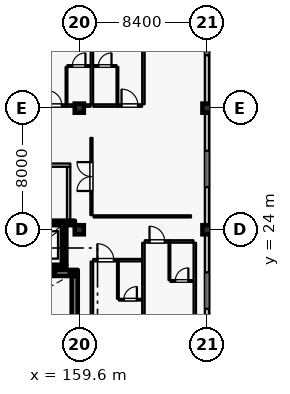
"""IFC4 building model, lengths in metres.
Left out: names, types, materials, properties, quantities, classifications, styles, units other than length and angle.
Written with IfcOpenShell. Run it as: python <this file> out.ifc"""

import sys

from ifc_helpers import new_model, si_unit, direction, frame, frame_2d, origin, origin_2d, place, context, subcontext, project, spatial, rectangle, hollow_rectangle, extrude, element, fill, save


model = new_model("IFC4")
c1 = context("Model", 3, precision=1e-05, world=origin(), true_north=direction((0.0, 1.0)))
c2 = subcontext(c1, "Body", "Model", "MODEL_VIEW")
j1 = project(units=[si_unit("LENGTHUNIT", "METRE"), si_unit("PLANEANGLEUNIT", "RADIAN")], contexts=[c1])
p1 = place(None, origin())
s1 = spatial("IfcSite", under=j1, at=p1, CompositionType="ELEMENT")
p2 = place(p1, origin())
s2 = spatial("IfcBuilding", under=s1, at=p2, CompositionType="ELEMENT")
p3 = place(p2, frame((0.0, 0.0, 43.2)))
s3 = spatial("IfcBuildingStorey", under=s2, at=p3, CompositionType="ELEMENT", Elevation=43.2)
for number, where, z_axis, x_axis in (
    (1, (159.6, 24.0, 0.0), (0.0, 0.0, 1.0), (1.0, 0.0, 0.0)),
    (2, (168.0, 32.0, 0.0), (0.0, 0.0, 1.0), (1.0, 0.0, 0.0)),
    (3, (159.6, 32.0, 0.0), (0.0, 0.0, 1.0), (1.0, 0.0, 0.0)),
    (4, (168.0, 24.0, 0.0), (0.0, 0.0, 1.0), (1.0, 0.0, 0.0)),
):
    element("IfcColumn", number, at=place(p3, frame(where, z_axis=z_axis, x_axis=x_axis)), inside=s3, PredefinedType="COLUMN", context=c2, shape_type="SweptSolid", body=[
        extrude(rectangle(XDim=0.6, YDim=0.6, at=origin_2d()), origin(), (0.0, 0.0, 1.0), 4.2),
    ])
p4 = place(p3, frame((168.0, 39.7, 0.0), z_axis=(0.0, 0.0, 1.0), x_axis=(0.0, -1.0, 0.0)))
e5 = element("IfcWall", 5, at=p4, inside=s3, PredefinedType="SOLIDWALL", context=c2, shape_type="SweptSolid", body=[
    extrude(rectangle(XDim=7.4, YDim=0.28, at=frame_2d((3.7, 0.0))), origin(), (0.0, 0.0, 1.0), 3.3),
])
p5 = place(p4, frame((3.175, 0.0, 0.75)))
e6 = element("IfcOpeningElement", 6, at=p5, cuts=e5, PredefinedType="OPENING", context=c2, shape_type="SweptSolid", body=[
    extrude(rectangle(XDim=1.05, YDim=1.65, at=frame_2d((0.525, 0.825))), frame((0.0, 0.15, 0.0), z_axis=(0.0, -1.0, 0.0), x_axis=(1.0, 0.0, 0.0)), (0.0, 0.0, 1.0), 0.3),
])
p6 = place(p3, frame((168.0, 31.7, 0.0), z_axis=(0.0, 0.0, 1.0), x_axis=(0.0, -1.0, 0.0)))
e7 = element("IfcWall", 7, at=p6, inside=s3, PredefinedType="SOLIDWALL", context=c2, shape_type="SweptSolid", body=[
    extrude(rectangle(XDim=7.4, YDim=0.28, at=frame_2d((3.7, 0.0))), origin(), (0.0, 0.0, 1.0), 3.3),
])
p7 = place(p6, frame((2.5, 0.0, 0.75)))
e8 = element("IfcOpeningElement", 8, at=p7, cuts=e7, PredefinedType="OPENING", context=c2, shape_type="SweptSolid", body=[
    extrude(rectangle(XDim=2.4, YDim=1.65, at=frame_2d((1.2, 0.825))), frame((0.0, 0.15, 0.0), z_axis=(0.0, -1.0, 0.0), x_axis=(1.0, 0.0, 0.0)), (0.0, 0.0, 1.0), 0.3),
])
p8 = place(p3, frame((168.0, 23.7, 0.0), z_axis=(0.0, 0.0, 1.0), x_axis=(0.0, -1.0, 0.0)))
e9 = element("IfcWall", 9, at=p8, inside=s3, PredefinedType="SOLIDWALL", context=c2, shape_type="SweptSolid", body=[
    extrude(rectangle(XDim=7.4, YDim=0.28, at=frame_2d((3.7, 0.0))), origin(), (0.0, 0.0, 1.0), 3.3),
])
p9 = place(p8, frame((2.5, 0.0, 0.75)))
e10 = element("IfcOpeningElement", 10, at=p9, cuts=e9, PredefinedType="OPENING", context=c2, shape_type="SweptSolid", body=[
    extrude(rectangle(XDim=2.4, YDim=1.65, at=frame_2d((1.2, 0.825))), frame((0.0, 0.15, 0.0), z_axis=(0.0, -1.0, 0.0), x_axis=(1.0, 0.0, 0.0)), (0.0, 0.0, 1.0), 0.3),
])
p10 = place(p3, frame((155.25, 21.55, 0.0), z_axis=(0.0, 0.0, 1.0), x_axis=(1.0, 0.0, 0.0)))
e11 = element("IfcWall", 11, at=p10, inside=s3, PredefinedType="SHEAR", context=c2, shape_type="SweptSolid", body=[
    extrude(rectangle(XDim=3.5, YDim=0.3, at=frame_2d((1.75, 0.0))), origin(), (0.0, 0.0, 1.0), 3.935),
])
p11 = place(p3, frame((158.6, 21.705, 0.0), z_axis=(0.0, 0.0, 1.0), x_axis=(0.0, 1.0, 0.0)))
e12 = element("IfcWall", 12, at=p11, inside=s3, PredefinedType="SHEAR", context=c2, shape_type="SweptSolid", body=[
    extrude(rectangle(XDim=2.59, YDim=0.3, at=frame_2d((1.295, 0.0))), origin(), (0.0, 0.0, 1.0), 3.935),
])
p12 = place(p3, frame((159.31, 24.45, 0.0), z_axis=(0.0, 0.0, 1.0), x_axis=(-1.0, 0.0, 0.0)))
e13 = element("IfcWall", 13, at=p12, inside=s3, PredefinedType="SHEAR", context=c2, shape_type="SweptSolid", body=[
    extrude(rectangle(XDim=4.06, YDim=0.3, at=frame_2d((2.03, 0.0))), origin(), (0.0, 0.0, 1.0), 3.935),
])
p13 = place(p12, frame((1.685, 0.0, 0.0)))
e14 = element("IfcOpeningElement", 14, at=p13, cuts=e13, PredefinedType="OPENING", context=c2, shape_type="SweptSolid", body=[
    extrude(rectangle(XDim=1.25, YDim=2.25, at=frame_2d((0.625, 1.125))), frame((0.0, 0.16, 0.0), z_axis=(0.0, -1.0, 0.0), x_axis=(1.0, 0.0, 0.0)), (0.0, 0.0, 1.0), 0.32),
])
p14 = place(p3, frame((159.3, 17.005, 0.0), z_axis=(0.0, 0.0, 1.0), x_axis=(0.0, 1.0, 0.0)))
e15 = element("IfcWall", 15, at=p14, inside=s3, PredefinedType="SHEAR", context=c2, shape_type="SweptSolid", body=[
    extrude(rectangle(XDim=3.95, YDim=0.4, at=frame_2d((1.975, 0.0))), origin(), (0.0, 0.0, 1.0), 3.935),
])
p15 = place(p3, frame((151.3, 21.16, 0.0), z_axis=(0.0, 0.0, 1.0), x_axis=(1.0, 0.0, 0.0)))
e16 = element("IfcWall", 16, at=p15, inside=s3, PredefinedType="SHEAR", context=c2, shape_type="SweptSolid", body=[
    extrude(rectangle(XDim=8.2, YDim=0.4, at=frame_2d((4.1, 0.0))), origin(), (0.0, 0.0, 1.0), 3.935),
])
p16 = place(p15, frame((0.43, 0.0, 0.0)))
e17 = element("IfcOpeningElement", 17, at=p16, cuts=e16, PredefinedType="OPENING", context=c2, shape_type="SweptSolid", body=[
    extrude(rectangle(XDim=1.16, YDim=2.2, at=frame_2d((0.58, 1.1))), frame((0.0, 0.21, 0.0), z_axis=(0.0, -1.0, 0.0), x_axis=(1.0, 0.0, 0.0)), (0.0, 0.0, 1.0), 0.42),
])
p17 = place(p3, frame((158.9, 24.605, 0.0), z_axis=(0.0, 0.0, 1.0), x_axis=(0.0, 1.0, 0.0)))
e18 = element("IfcWall", 18, at=p17, inside=s3, PredefinedType="PARTITIONING", context=c2, shape_type="SweptSolid", body=[
    extrude(rectangle(XDim=3.53, YDim=0.22, at=frame_2d((1.765, 0.0))), origin(), (0.0, 0.0, 1.0), 3.935),
])
p18 = place(p3, frame((154.99, 28.25, 0.0), z_axis=(0.0, 0.0, 1.0), x_axis=(1.0, 0.0, 0.0)))
e19 = element("IfcWall", 19, at=p18, inside=s3, PredefinedType="PARTITIONING", context=c2, shape_type="SweptSolid", body=[
    extrude(rectangle(XDim=4.02, YDim=0.22, at=frame_2d((2.01, 0.0))), origin(), (0.0, 0.0, 1.0), 3.935),
])
p19 = place(p18, frame((1.39, 0.0, 0.0)))
e20 = element("IfcOpeningElement", 20, at=p19, cuts=e19, PredefinedType="OPENING", context=c2, shape_type="SweptSolid", body=[
    extrude(rectangle(XDim=1.24, YDim=2.2, at=frame_2d((0.62, 1.1))), frame((0.0, 0.12, 0.0), z_axis=(0.0, -1.0, 0.0), x_axis=(1.0, 0.0, 0.0)), (0.0, 0.0, 1.0), 0.24),
])
for number, where, z_axis, x_axis in (
    (21, (157.86, 21.16, -1.8), (0.0, 0.0, 1.0), (1.0, 0.0, 0.0)),
    (22, (159.12, 21.16, -1.8), (0.0, 0.0, 1.0), (1.0, 0.0, 0.0)),
):
    element("IfcColumn", number, at=place(p3, frame(where, z_axis=z_axis, x_axis=x_axis)), inside=s3, PredefinedType="COLUMN", context=c2, shape_type="SweptSolid", body=[
        extrude(hollow_rectangle(XDim=0.3, YDim=0.3, WallThickness=0.012, at=origin_2d()), origin(), (0.0, 0.0, 1.0), 3.72),
    ])
p20 = place(p3, frame((157.14, 32.17, 0.0), z_axis=(0.0, 0.0, 1.0), x_axis=(1.0, 0.0, 0.0)))
e23 = element("IfcWall", 23, at=p20, inside=s3, PredefinedType="PARTITIONING", context=c2, shape_type="SweptSolid", body=[
    extrude(rectangle(XDim=1.62, YDim=0.16, at=frame_2d((0.81, 0.0))), origin(), (0.0, 0.0, 1.0), 3.39),
])
p21 = place(p20, frame((0.31, 0.0, 0.0)))
e24 = element("IfcOpeningElement", 24, at=p21, cuts=e23, PredefinedType="OPENING", context=c2, shape_type="SweptSolid", body=[
    extrude(rectangle(XDim=1.0, YDim=2.25, at=frame_2d((0.5, 1.125))), frame((0.0, 0.09, 0.0), z_axis=(0.0, -1.0, 0.0), x_axis=(1.0, 0.0, 0.0)), (0.0, 0.0, 1.0), 0.18),
])
p22 = place(p3, frame((158.77, 32.17, 0.0), z_axis=(0.0, 0.0, 1.0), x_axis=(1.0, 0.0, 0.0)))
e25 = element("IfcWall", 25, at=p22, inside=s3, PredefinedType="PARTITIONING", context=c2, shape_type="SweptSolid", body=[
    extrude(rectangle(XDim=0.534, YDim=0.16, at=frame_2d((0.267, 0.0))), origin(), (0.0, 0.0, 1.0), 3.39),
])
p23 = place(p3, frame((158.76, 32.26, 0.0), z_axis=(0.0, 0.0, 1.0), x_axis=(0.0, 1.0, 0.0)))
e26 = element("IfcWall", 26, at=p23, inside=s3, PredefinedType="PARTITIONING", context=c2, shape_type="SweptSolid", body=[
    extrude(rectangle(XDim=2.45, YDim=0.115, at=frame_2d((1.225, 0.0))), origin(), (0.0, 0.0, 1.0), 3.935),
])
p24 = place(p3, frame((158.82, 34.77, 0.0), z_axis=(0.0, 0.0, 1.0), x_axis=(1.0, 0.0, 0.0)))
e27 = element("IfcWall", 27, at=p24, inside=s3, PredefinedType="PARTITIONING", context=c2, shape_type="SweptSolid", body=[
    extrude(rectangle(XDim=1.51, YDim=0.115, at=frame_2d((0.755, 0.0))), origin(), (0.0, 0.0, 1.0), 3.935),
])
p25 = place(p24, frame((0.325, 0.0, 0.0)))
e28 = element("IfcOpeningElement", 28, at=p25, cuts=e27, PredefinedType="OPENING", context=c2, shape_type="SweptSolid", body=[
    extrude(rectangle(XDim=0.86, YDim=2.12, at=frame_2d((0.43, 1.06))), frame((0.0, 0.067, 0.0), z_axis=(0.0, -1.0, 0.0), x_axis=(1.0, 0.0, 0.0)), (0.0, 0.0, 1.0), 0.135),
])
p26 = place(p3, frame((160.52, 32.17, 0.0), z_axis=(0.0, 0.0, 1.0), x_axis=(1.0, 0.0, 0.0)))
e29 = element("IfcWall", 29, at=p26, inside=s3, PredefinedType="PARTITIONING", context=c2, shape_type="SweptSolid", body=[
    extrude(rectangle(XDim=1.58, YDim=0.16, at=frame_2d((0.79, 0.0))), origin(), (0.0, 0.0, 1.0), 3.935),
])
p27 = place(p3, frame((162.11, 32.17, 0.0), z_axis=(0.0, 0.0, 1.0), x_axis=(1.0, 0.0, 0.0)))
e30 = element("IfcWall", 30, at=p27, inside=s3, PredefinedType="PARTITIONING", context=c2, shape_type="SweptSolid", body=[
    extrude(rectangle(XDim=1.62, YDim=0.16, at=frame_2d((0.81, 0.0))), origin(), (0.0, 0.0, 1.0), 3.935),
])
p28 = place(p27, frame((0.27, 0.0, 0.0)))
e31 = element("IfcOpeningElement", 31, at=p28, cuts=e30, PredefinedType="OPENING", context=c2, shape_type="SweptSolid", body=[
    extrude(rectangle(XDim=1.08, YDim=2.3, at=frame_2d((0.54, 1.15))), frame((0.0, 0.09, 0.0), z_axis=(0.0, -1.0, 0.0), x_axis=(1.0, 0.0, 0.0)), (0.0, 0.0, 1.0), 0.18),
])
p29 = place(p3, frame((162.11, 32.26, 0.0), z_axis=(0.0, 0.0, 1.0), x_axis=(0.0, 1.0, 0.0)))
e32 = element("IfcWall", 32, at=p29, inside=s3, PredefinedType="PARTITIONING", context=c2, shape_type="SweptSolid", body=[
    extrude(rectangle(XDim=2.45, YDim=0.115, at=frame_2d((1.225, 0.0))), origin(), (0.0, 0.0, 1.0), 3.935),
])
p30 = place(p3, frame((160.53, 34.77, 0.0), z_axis=(0.0, 0.0, 1.0), x_axis=(1.0, 0.0, 0.0)))
e33 = element("IfcWall", 33, at=p30, inside=s3, PredefinedType="PARTITIONING", context=c2, shape_type="SweptSolid", body=[
    extrude(rectangle(XDim=1.52, YDim=0.115, at=frame_2d((0.76, 0.0))), origin(), (0.0, 0.0, 1.0), 3.935),
])
p31 = place(p30, frame((0.33, 0.0, 0.0)))
e34 = element("IfcOpeningElement", 34, at=p31, cuts=e33, PredefinedType="OPENING", context=c2, shape_type="SweptSolid", body=[
    extrude(rectangle(XDim=0.86, YDim=2.12, at=frame_2d((0.43, 1.06))), frame((0.0, 0.067, 0.0), z_axis=(0.0, -1.0, 0.0), x_axis=(1.0, 0.0, 0.0)), (0.0, 0.0, 1.0), 0.135),
])
for number, where, z_axis, x_axis in (
    (35, (160.43, 32.26, 0.0), (0.0, 0.0, 1.0), (0.0, 1.0, 0.0)),
    (36, (163.82, 32.26, 0.0), (0.0, 0.0, 1.0), (0.0, 1.0, 0.0)),
):
    element("IfcWall", number, at=place(p3, frame(where, z_axis=z_axis, x_axis=x_axis)), inside=s3, PredefinedType="PARTITIONING", context=c2, shape_type="SweptSolid", body=[
        extrude(rectangle(XDim=8.19, YDim=0.16, at=frame_2d((4.095, 0.0))), origin(), (0.0, 0.0, 1.0), 3.935),
    ])
p32 = place(p3, frame((160.52, 22.0, 0.0), z_axis=(0.0, 0.0, 1.0), x_axis=(1.0, 0.0, 0.0)))
e37 = element("IfcWall", 37, at=p32, inside=s3, PredefinedType="PARTITIONING", context=c2, shape_type="SweptSolid", body=[
    extrude(rectangle(XDim=1.62, YDim=0.16, at=frame_2d((0.81, 0.0))), origin(), (0.0, 0.0, 1.0), 3.935),
])
p33 = place(p32, frame((0.27, 0.0, 0.0)))
e38 = element("IfcOpeningElement", 38, at=p33, cuts=e37, PredefinedType="OPENING", context=c2, shape_type="SweptSolid", body=[
    extrude(rectangle(XDim=1.08, YDim=2.3, at=frame_2d((0.54, 1.15))), frame((0.0, 0.09, 0.0), z_axis=(0.0, -1.0, 0.0), x_axis=(1.0, 0.0, 0.0)), (0.0, 0.0, 1.0), 0.18),
])
p34 = place(p3, frame((162.15, 22.0, 0.0), z_axis=(0.0, 0.0, 1.0), x_axis=(1.0, 0.0, 0.0)))
e39 = element("IfcWall", 39, at=p34, inside=s3, PredefinedType="PARTITIONING", context=c2, shape_type="SweptSolid", body=[
    extrude(rectangle(XDim=1.58, YDim=0.16, at=frame_2d((0.79, 0.0))), origin(), (0.0, 0.0, 1.0), 3.935),
])
p35 = place(p3, frame((162.14, 19.46, 0.0), z_axis=(0.0, 0.0, 1.0), x_axis=(0.0, 1.0, 0.0)))
e40 = element("IfcWall", 40, at=p35, inside=s3, PredefinedType="PARTITIONING", context=c2, shape_type="SweptSolid", body=[
    extrude(rectangle(XDim=2.45, YDim=0.115, at=frame_2d((1.225, 0.0))), origin(), (0.0, 0.0, 1.0), 3.935),
])
p36 = place(p3, frame((162.2, 19.4, 0.0), z_axis=(0.0, 0.0, 1.0), x_axis=(1.0, 0.0, 0.0)))
e41 = element("IfcWall", 41, at=p36, inside=s3, PredefinedType="PARTITIONING", context=c2, shape_type="SweptSolid", body=[
    extrude(rectangle(XDim=1.52, YDim=0.115, at=frame_2d((0.76, 0.0))), origin(), (0.0, 0.0, 1.0), 3.935),
])
p37 = place(p36, frame((0.33, 0.0, 0.0)))
e42 = element("IfcOpeningElement", 42, at=p37, cuts=e41, PredefinedType="OPENING", context=c2, shape_type="SweptSolid", body=[
    extrude(rectangle(XDim=0.86, YDim=2.12, at=frame_2d((0.43, 1.06))), frame((0.0, 0.067, 0.0), z_axis=(0.0, -1.0, 0.0), x_axis=(1.0, 0.0, 0.0)), (0.0, 0.0, 1.0), 0.135),
])
p38 = place(p3, frame((160.43, 12.36, 0.0), z_axis=(0.0, 0.0, 1.0), x_axis=(0.0, 1.0, 0.0)))
e43 = element("IfcWall", 43, at=p38, inside=s3, PredefinedType="PARTITIONING", context=c2, shape_type="SweptSolid", body=[
    extrude(rectangle(XDim=9.55, YDim=0.16, at=frame_2d((4.775, 0.0))), origin(), (0.0, 0.0, 1.0), 3.935),
])
p39 = place(p3, frame((163.91, 23.23, 0.0), z_axis=(0.0, 0.0, 1.0), x_axis=(1.0, 0.0, 0.0)))
e44 = element("IfcWall", 44, at=p39, inside=s3, PredefinedType="PARTITIONING", context=c2, shape_type="SweptSolid", body=[
    extrude(rectangle(XDim=1.62, YDim=0.16, at=frame_2d((0.81, 0.0))), origin(), (0.0, 0.0, 1.0), 3.935),
])
p40 = place(p39, frame((0.31, 0.0, 0.0)))
e45 = element("IfcOpeningElement", 45, at=p40, cuts=e44, PredefinedType="OPENING", context=c2, shape_type="SweptSolid", body=[
    extrude(rectangle(XDim=1.0, YDim=2.25, at=frame_2d((0.5, 1.125))), frame((0.0, 0.09, 0.0), z_axis=(0.0, -1.0, 0.0), x_axis=(1.0, 0.0, 0.0)), (0.0, 0.0, 1.0), 0.18),
])
p41 = place(p3, frame((165.54, 23.23, 0.0), z_axis=(0.0, 0.0, 1.0), x_axis=(1.0, 0.0, 0.0)))
e46 = element("IfcWall", 46, at=p41, inside=s3, PredefinedType="PARTITIONING", context=c2, shape_type="SweptSolid", body=[
    extrude(rectangle(XDim=1.57, YDim=0.16, at=frame_2d((0.785, 0.0))), origin(), (0.0, 0.0, 1.0), 3.935),
])
p42 = place(p3, frame((165.53, 20.69, 0.0), z_axis=(0.0, 0.0, 1.0), x_axis=(0.0, 1.0, 0.0)))
e47 = element("IfcWall", 47, at=p42, inside=s3, PredefinedType="PARTITIONING", context=c2, shape_type="SweptSolid", body=[
    extrude(rectangle(XDim=2.45, YDim=0.115, at=frame_2d((1.225, 0.0))), origin(), (0.0, 0.0, 1.0), 3.935),
])
p43 = place(p3, frame((165.59, 20.63, 0.0), z_axis=(0.0, 0.0, 1.0), x_axis=(1.0, 0.0, 0.0)))
e48 = element("IfcWall", 48, at=p43, inside=s3, PredefinedType="PARTITIONING", context=c2, shape_type="SweptSolid", body=[
    extrude(rectangle(XDim=1.51, YDim=0.115, at=frame_2d((0.755, 0.0))), origin(), (0.0, 0.0, 1.0), 3.935),
])
p44 = place(p43, frame((0.325, 0.0, 0.0)))
e49 = element("IfcOpeningElement", 49, at=p44, cuts=e48, PredefinedType="OPENING", context=c2, shape_type="SweptSolid", body=[
    extrude(rectangle(XDim=0.86, YDim=2.12, at=frame_2d((0.43, 1.06))), frame((0.0, 0.067, 0.0), z_axis=(0.0, -1.0, 0.0), x_axis=(1.0, 0.0, 0.0)), (0.0, 0.0, 1.0), 0.135),
])
for number, where, z_axis, x_axis in (
    (50, (163.82, 15.58, 0.0), (0.0, 0.0, 1.0), (0.0, 1.0, 0.0)),
    (51, (167.2, 15.58, 0.0), (0.0, 0.0, 1.0), (0.0, 1.0, 0.0)),
):
    element("IfcWall", number, at=place(p3, frame(where, z_axis=z_axis, x_axis=x_axis)), inside=s3, PredefinedType="PARTITIONING", context=c2, shape_type="SweptSolid", body=[
        extrude(rectangle(XDim=7.56, YDim=0.16, at=frame_2d((3.78, 0.0))), origin(), (0.0, 0.0, 1.0), 3.935),
    ])
p45 = place(p3, frame((160.4, 24.96, 0.0), z_axis=(0.0, 0.0, 1.0), x_axis=(0.0, 1.0, 0.0)))
e52 = element("IfcWall", 52, at=p45, inside=s3, PredefinedType="PARTITIONING", context=c2, shape_type="SweptSolid", body=[
    extrude(rectangle(XDim=5.08, YDim=0.14, at=frame_2d((2.54, 0.0))), origin(), (0.0, 0.0, 1.0), 3.935),
])
p46 = place(p45, frame((1.59, 0.0, 0.0)))
e53 = element("IfcOpeningElement", 53, at=p46, cuts=e52, PredefinedType="OPENING", context=c2, shape_type="SweptSolid", body=[
    extrude(rectangle(XDim=1.9, YDim=2.4, at=frame_2d((0.95, 1.2))), frame((0.0, 0.08, 0.0), z_axis=(0.0, -1.0, 0.0), x_axis=(1.0, 0.0, 0.0)), (0.0, 0.0, 1.0), 0.16),
])
p47 = place(p3, frame((160.54, 24.88, 0.0), z_axis=(0.0, 0.0, 1.0), x_axis=(1.0, 0.0, 0.0)))
e54 = element("IfcWall", 54, at=p47, inside=s3, PredefinedType="PARTITIONING", context=c2, shape_type="SweptSolid", body=[
    extrude(rectangle(XDim=6.41, YDim=0.14, at=frame_2d((3.205, 0.0))), origin(), (0.0, 0.0, 1.0), 3.935),
])
p48 = place(p3, frame((159.304, 32.17, 0.0), z_axis=(0.0, 0.0, 1.0), x_axis=(1.0, 0.0, 0.0)))
e55 = element("IfcWall", 55, at=p48, inside=s3, PredefinedType="PARTITIONING", context=c2, shape_type="SweptSolid", body=[
    extrude(rectangle(XDim=1.036, YDim=0.16, at=frame_2d((0.518, 0.0))), origin(), (0.0, 0.0, 1.0), 3.935),
])
p49 = place(p5, origin())
e56 = element("IfcWindow", 56, at=p49, inside=s3, PartitioningType="SINGLE_PANEL", PredefinedType="WINDOW", context=c2, shape_type="SweptSolid", body=[
    extrude(rectangle(XDim=1.05, YDim=1.65, at=frame_2d((0.525, 0.825))), frame((0.0, 0.03, 0.0), z_axis=(0.0, -1.0, 0.0), x_axis=(1.0, 0.0, 0.0)), (0.0, 0.0, 1.0), 0.06),
])
fill(e6, e56)
p50 = place(p7, origin())
e57 = element("IfcWindow", 57, at=p50, inside=s3, PartitioningType="DOUBLE_PANEL_VERTICAL", PredefinedType="WINDOW", context=c2, shape_type="SweptSolid", body=[
    extrude(rectangle(XDim=2.4, YDim=1.65, at=frame_2d((1.2, 0.825))), frame((0.0, 0.03, 0.0), z_axis=(0.0, -1.0, 0.0), x_axis=(1.0, 0.0, 0.0)), (0.0, 0.0, 1.0), 0.06),
])
fill(e8, e57)
p51 = place(p9, origin())
e58 = element("IfcWindow", 58, at=p51, inside=s3, PartitioningType="DOUBLE_PANEL_VERTICAL", PredefinedType="WINDOW", context=c2, shape_type="SweptSolid", body=[
    extrude(rectangle(XDim=2.4, YDim=1.65, at=frame_2d((1.2, 0.825))), frame((0.0, 0.03, 0.0), z_axis=(0.0, -1.0, 0.0), x_axis=(1.0, 0.0, 0.0)), (0.0, 0.0, 1.0), 0.06),
])
fill(e10, e58)
p52 = place(p21, origin())
e59 = element("IfcDoor", 59, at=p52, inside=s3, OperationType="SINGLE_SWING_LEFT", PredefinedType="DOOR", context=c2, shape_type="SweptSolid", body=[
    extrude(rectangle(XDim=1.0, YDim=2.25, at=frame_2d((0.5, 1.125))), frame((0.0, 0.025, 0.0), z_axis=(0.0, -1.0, 0.0), x_axis=(1.0, 0.0, 0.0)), (0.0, 0.0, 1.0), 0.05),
])
fill(e24, e59)
p53 = place(p25, origin())
e60 = element("IfcDoor", 60, at=p53, inside=s3, OperationType="SINGLE_SWING_RIGHT", PredefinedType="DOOR", context=c2, shape_type="SweptSolid", body=[
    extrude(rectangle(XDim=0.86, YDim=2.12, at=frame_2d((0.43, 1.06))), frame((0.0, 0.025, 0.0), z_axis=(0.0, -1.0, 0.0), x_axis=(1.0, 0.0, 0.0)), (0.0, 0.0, 1.0), 0.05),
])
fill(e28, e60)
p54 = place(p28, origin())
e61 = element("IfcDoor", 61, at=p54, inside=s3, OperationType="SINGLE_SWING_LEFT", PredefinedType="DOOR", context=c2, shape_type="SweptSolid", body=[
    extrude(rectangle(XDim=1.08, YDim=2.3, at=frame_2d((0.54, 1.15))), frame((0.0, 0.025, 0.0), z_axis=(0.0, -1.0, 0.0), x_axis=(1.0, 0.0, 0.0)), (0.0, 0.0, 1.0), 0.05),
])
fill(e31, e61)
p55 = place(p31, origin())
e62 = element("IfcDoor", 62, at=p55, inside=s3, OperationType="SINGLE_SWING_RIGHT", PredefinedType="DOOR", context=c2, shape_type="SweptSolid", body=[
    extrude(rectangle(XDim=0.86, YDim=2.12, at=frame_2d((0.43, 1.06))), frame((0.0, 0.025, 0.0), z_axis=(0.0, -1.0, 0.0), x_axis=(1.0, 0.0, 0.0)), (0.0, 0.0, 1.0), 0.05),
])
fill(e34, e62)
p56 = place(p33, origin())
e63 = element("IfcDoor", 63, at=p56, inside=s3, OperationType="SINGLE_SWING_LEFT", PredefinedType="DOOR", context=c2, shape_type="SweptSolid", body=[
    extrude(rectangle(XDim=1.08, YDim=2.3, at=frame_2d((0.54, 1.15))), frame((0.0, 0.025, 0.0), z_axis=(0.0, -1.0, 0.0), x_axis=(1.0, 0.0, 0.0)), (0.0, 0.0, 1.0), 0.05),
])
fill(e38, e63)
p57 = place(p37, origin())
e64 = element("IfcDoor", 64, at=p57, inside=s3, OperationType="SINGLE_SWING_RIGHT", PredefinedType="DOOR", context=c2, shape_type="SweptSolid", body=[
    extrude(rectangle(XDim=0.86, YDim=2.12, at=frame_2d((0.43, 1.06))), frame((0.0, 0.025, 0.0), z_axis=(0.0, -1.0, 0.0), x_axis=(1.0, 0.0, 0.0)), (0.0, 0.0, 1.0), 0.05),
])
fill(e42, e64)
p58 = place(p40, origin())
e65 = element("IfcDoor", 65, at=p58, inside=s3, OperationType="SINGLE_SWING_LEFT", PredefinedType="DOOR", context=c2, shape_type="SweptSolid", body=[
    extrude(rectangle(XDim=1.0, YDim=2.25, at=frame_2d((0.5, 1.125))), frame((0.0, 0.025, 0.0), z_axis=(0.0, -1.0, 0.0), x_axis=(1.0, 0.0, 0.0)), (0.0, 0.0, 1.0), 0.05),
])
fill(e45, e65)
p59 = place(p44, origin())
e66 = element("IfcDoor", 66, at=p59, inside=s3, OperationType="SINGLE_SWING_RIGHT", PredefinedType="DOOR", context=c2, shape_type="SweptSolid", body=[
    extrude(rectangle(XDim=0.86, YDim=2.12, at=frame_2d((0.43, 1.06))), frame((0.0, 0.025, 0.0), z_axis=(0.0, -1.0, 0.0), x_axis=(1.0, 0.0, 0.0)), (0.0, 0.0, 1.0), 0.05),
])
fill(e49, e66)
p60 = place(p46, origin())
e67 = element("IfcDoor", 67, at=p60, inside=s3, OperationType="DOUBLE_DOOR_SINGLE_SWING", PredefinedType="DOOR", context=c2, shape_type="SweptSolid", body=[
    extrude(rectangle(XDim=1.9, YDim=2.4, at=frame_2d((0.95, 1.2))), frame((0.0, 0.025, 0.0), z_axis=(0.0, -1.0, 0.0), x_axis=(1.0, 0.0, 0.0)), (0.0, 0.0, 1.0), 0.05),
])
fill(e53, e67)
save(model, sys.argv[1])
